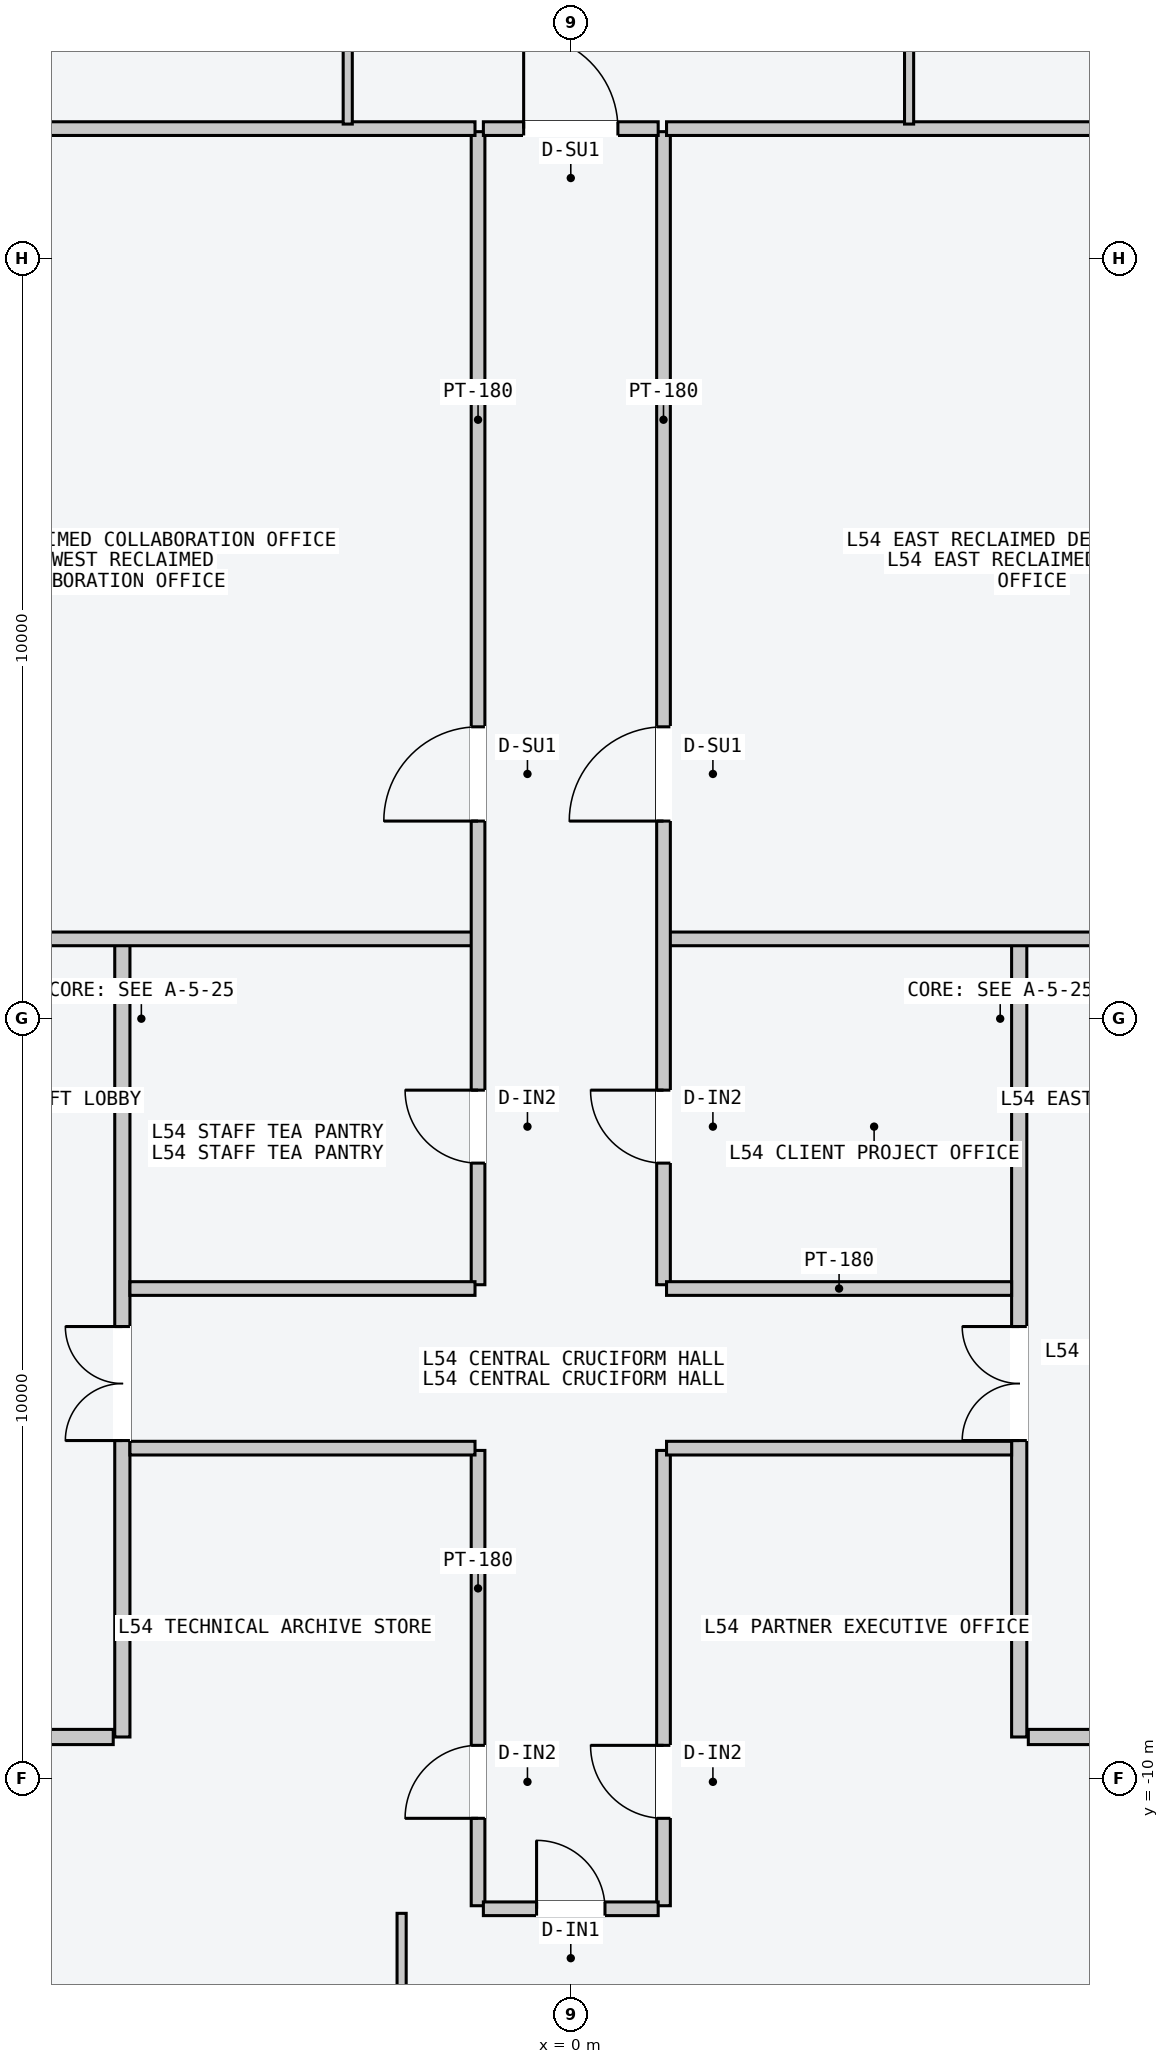
"""IFC4 building model, lengths in metres.
Left out: names, types, materials, properties, quantities, classifications, styles, units other than length and angle.
Written with IfcOpenShell. Run it as: python <this file> out.ifc"""

import sys

from ifc_helpers import new_model, si_unit, direction, frame, frame_2d, origin, place, context, subcontext, project, spatial, rectangle, extrude, element, fill, save


model = new_model("IFC4")
c1 = context("Model", 3, precision=1e-05, world=origin(), true_north=direction((0.0, 1.0)))
c2 = subcontext(c1, "Body", "Model", "MODEL_VIEW")
j1 = project(units=[si_unit("LENGTHUNIT", "METRE"), si_unit("PLANEANGLEUNIT", "RADIAN")], contexts=[c1])
p1 = place(None, origin())
s1 = spatial("IfcSite", under=j1, at=p1, CompositionType="ELEMENT")
p2 = place(p1, origin())
s2 = spatial("IfcBuilding", under=s1, at=p2, CompositionType="ELEMENT")
p3 = place(p2, frame((0.0, 0.0, 205.5)))
s3 = spatial("IfcBuildingStorey", under=s2, at=p3, CompositionType="ELEMENT", Elevation=205.5)
p4 = place(p3, frame((-5.9, -9.45, 0.0), z_axis=(0.0, 0.0, 1.0), x_axis=(0.0, 1.0, 0.0)))
e1 = element("IfcWall", 1, at=p4, inside=s3, PredefinedType="PARTITIONING", context=c2, shape_type="SweptSolid", body=[
    extrude(rectangle(XDim=10.5, YDim=0.2, at=frame_2d((5.25, 0.0))), origin(), (0.0, 0.0, 1.0), 3.4),
])
p5 = place(p4, frame((3.9, 0.0, 0.0)))
e2 = element("IfcOpeningElement", 2, at=p5, cuts=e1, PredefinedType="OPENING", context=c2, shape_type="SweptSolid", body=[
    extrude(rectangle(XDim=1.5, YDim=2.2, at=frame_2d((0.75, 1.1))), frame((0.0, 0.11, 0.0), z_axis=(0.0, -1.0, 0.0), x_axis=(1.0, 0.0, 0.0)), (0.0, 0.0, 1.0), 0.22),
])
p6 = place(p3, frame((-6.02, -9.45, 0.0), z_axis=(0.0, 0.0, 1.0), x_axis=(-1.0, 0.0, 0.0)))
e3 = element("IfcWall", 3, at=p6, inside=s3, PredefinedType="PARTITIONING", context=c2, shape_type="SweptSolid", body=[
    extrude(rectangle(XDim=1.8, YDim=0.2, at=frame_2d((0.9, 0.0))), origin(), (0.0, 0.0, 1.0), 3.4),
])
p7 = place(p3, frame((5.9, -9.45, 0.0), z_axis=(0.0, 0.0, 1.0), x_axis=(0.0, 1.0, 0.0)))
e4 = element("IfcWall", 4, at=p7, inside=s3, PredefinedType="PARTITIONING", context=c2, shape_type="SweptSolid", body=[
    extrude(rectangle(XDim=10.5, YDim=0.2, at=frame_2d((5.25, 0.0))), origin(), (0.0, 0.0, 1.0), 3.4),
])
p8 = place(p7, frame((3.9, 0.0, 0.0)))
e5 = element("IfcOpeningElement", 5, at=p8, cuts=e4, PredefinedType="OPENING", context=c2, shape_type="SweptSolid", body=[
    extrude(rectangle(XDim=1.5, YDim=2.2, at=frame_2d((0.75, 1.1))), frame((0.0, 0.11, 0.0), z_axis=(0.0, -1.0, 0.0), x_axis=(1.0, 0.0, 0.0)), (0.0, 0.0, 1.0), 0.22),
])
p9 = place(p3, frame((6.02, -9.45, 0.0), z_axis=(0.0, 0.0, 1.0), x_axis=(1.0, 0.0, 0.0)))
e6 = element("IfcWall", 6, at=p9, inside=s3, PredefinedType="PARTITIONING", context=c2, shape_type="SweptSolid", body=[
    extrude(rectangle(XDim=1.8, YDim=0.2, at=frame_2d((0.9, 0.0))), origin(), (0.0, 0.0, 1.0), 3.4),
])
p10 = place(p3, frame((-10.05, 1.05, 0.0), z_axis=(0.0, 0.0, 1.0), x_axis=(1.0, 0.0, 0.0)))
e7 = element("IfcWall", 7, at=p10, inside=s3, PredefinedType="PARTITIONING", context=c2, shape_type="SweptSolid", body=[
    extrude(rectangle(XDim=8.79, YDim=0.18, at=frame_2d((4.395, 0.0))), origin(), (0.0, 0.0, 1.0), 3.4),
])
p11 = place(p3, frame((-1.22, -3.5, 0.0), z_axis=(0.0, 0.0, 1.0), x_axis=(0.0, 1.0, 0.0)))
e8 = element("IfcWall", 8, at=p11, inside=s3, PredefinedType="PARTITIONING", context=c2, shape_type="SweptSolid", body=[
    extrude(rectangle(XDim=15.17, YDim=0.18, at=frame_2d((7.585, 0.0))), origin(), (0.0, 0.0, 1.0), 3.4),
])
p12 = place(p11, frame((6.1, 0.0, 0.0)))
e9 = element("IfcOpeningElement", 9, at=p12, cuts=e8, PredefinedType="OPENING", context=c2, shape_type="SweptSolid", body=[
    extrude(rectangle(XDim=1.24, YDim=2.24, at=frame_2d((0.62, 1.12))), frame((0.0, 0.1, 0.0), z_axis=(0.0, -1.0, 0.0), x_axis=(1.0, 0.0, 0.0)), (0.0, 0.0, 1.0), 0.2),
])
p13 = place(p11, frame((1.6, 0.0, 0.0)))
e10 = element("IfcOpeningElement", 10, at=p13, cuts=e8, PredefinedType="OPENING", context=c2, shape_type="SweptSolid", body=[
    extrude(rectangle(XDim=0.96, YDim=2.18, at=frame_2d((0.48, 1.09))), frame((0.0, 0.1, 0.0), z_axis=(0.0, -1.0, 0.0), x_axis=(1.0, 0.0, 0.0)), (0.0, 0.0, 1.0), 0.2),
])
p14 = place(p3, frame((-7.5, 11.71, 0.0), z_axis=(0.0, 0.0, 1.0), x_axis=(1.0, 0.0, 0.0)))
e11 = element("IfcWall", 11, at=p14, inside=s3, PredefinedType="PARTITIONING", context=c2, shape_type="SweptSolid", body=[
    extrude(rectangle(XDim=6.24, YDim=0.18, at=frame_2d((3.12, 0.0))), origin(), (0.0, 0.0, 1.0), 3.4),
])
p15 = place(p3, frame((-5.8, -3.55, 0.0), z_axis=(0.0, 0.0, 1.0), x_axis=(1.0, 0.0, 0.0)))
e12 = element("IfcWall", 12, at=p15, inside=s3, PredefinedType="PARTITIONING", context=c2, shape_type="SweptSolid", body=[
    extrude(rectangle(XDim=4.54, YDim=0.18, at=frame_2d((2.27, 0.0))), origin(), (0.0, 0.0, 1.0), 3.4),
])
p16 = place(p3, frame((1.26, 1.05, 0.0), z_axis=(0.0, 0.0, 1.0), x_axis=(1.0, 0.0, 0.0)))
e13 = element("IfcWall", 13, at=p16, inside=s3, PredefinedType="PARTITIONING", context=c2, shape_type="SweptSolid", body=[
    extrude(rectangle(XDim=8.8, YDim=0.18, at=frame_2d((4.4, 0.0))), origin(), (0.0, 0.0, 1.0), 3.4),
])
p17 = place(p3, frame((1.22, -3.5, 0.0), z_axis=(0.0, 0.0, 1.0), x_axis=(0.0, 1.0, 0.0)))
e14 = element("IfcWall", 14, at=p17, inside=s3, PredefinedType="PARTITIONING", context=c2, shape_type="SweptSolid", body=[
    extrude(rectangle(XDim=15.17, YDim=0.18, at=frame_2d((7.585, 0.0))), origin(), (0.0, 0.0, 1.0), 3.4),
])
p18 = place(p17, frame((6.1, 0.0, 0.0)))
e15 = element("IfcOpeningElement", 15, at=p18, cuts=e14, PredefinedType="OPENING", context=c2, shape_type="SweptSolid", body=[
    extrude(rectangle(XDim=1.24, YDim=2.24, at=frame_2d((0.62, 1.12))), frame((0.0, 0.1, 0.0), z_axis=(0.0, -1.0, 0.0), x_axis=(1.0, 0.0, 0.0)), (0.0, 0.0, 1.0), 0.2),
])
p19 = place(p17, frame((1.6, 0.0, 0.0)))
e16 = element("IfcOpeningElement", 16, at=p19, cuts=e14, PredefinedType="OPENING", context=c2, shape_type="SweptSolid", body=[
    extrude(rectangle(XDim=0.96, YDim=2.18, at=frame_2d((0.48, 1.09))), frame((0.0, 0.1, 0.0), z_axis=(0.0, -1.0, 0.0), x_axis=(1.0, 0.0, 0.0)), (0.0, 0.0, 1.0), 0.2),
])
p20 = place(p3, frame((1.26, 11.71, 0.0), z_axis=(0.0, 0.0, 1.0), x_axis=(1.0, 0.0, 0.0)))
e17 = element("IfcWall", 17, at=p20, inside=s3, PredefinedType="PARTITIONING", context=c2, shape_type="SweptSolid", body=[
    extrude(rectangle(XDim=6.24, YDim=0.18, at=frame_2d((3.12, 0.0))), origin(), (0.0, 0.0, 1.0), 3.4),
])
p21 = place(p3, frame((1.26, -3.55, 0.0), z_axis=(0.0, 0.0, 1.0), x_axis=(1.0, 0.0, 0.0)))
e18 = element("IfcWall", 18, at=p21, inside=s3, PredefinedType="PARTITIONING", context=c2, shape_type="SweptSolid", body=[
    extrude(rectangle(XDim=4.54, YDim=0.18, at=frame_2d((2.27, 0.0))), origin(), (0.0, 0.0, 1.0), 3.4),
])
p22 = place(p3, frame((-1.22, -11.67, 0.0), z_axis=(0.0, 0.0, 1.0), x_axis=(0.0, 1.0, 0.0)))
e19 = element("IfcWall", 19, at=p22, inside=s3, PredefinedType="PARTITIONING", context=c2, shape_type="SweptSolid", body=[
    extrude(rectangle(XDim=5.99, YDim=0.18, at=frame_2d((2.995, 0.0))), origin(), (0.0, 0.0, 1.0), 3.4),
])
p23 = place(p22, frame((1.15, 0.0, 0.0)))
e20 = element("IfcOpeningElement", 20, at=p23, cuts=e19, PredefinedType="OPENING", context=c2, shape_type="SweptSolid", body=[
    extrude(rectangle(XDim=0.96, YDim=2.18, at=frame_2d((0.48, 1.09))), frame((0.0, 0.1, 0.0), z_axis=(0.0, -1.0, 0.0), x_axis=(1.0, 0.0, 0.0)), (0.0, 0.0, 1.0), 0.2),
])
p24 = place(p3, frame((1.22, -11.67, 0.0), z_axis=(0.0, 0.0, 1.0), x_axis=(0.0, 1.0, 0.0)))
e21 = element("IfcWall", 21, at=p24, inside=s3, PredefinedType="PARTITIONING", context=c2, shape_type="SweptSolid", body=[
    extrude(rectangle(XDim=5.99, YDim=0.18, at=frame_2d((2.995, 0.0))), origin(), (0.0, 0.0, 1.0), 3.4),
])
p25 = place(p24, frame((1.15, 0.0, 0.0)))
e22 = element("IfcOpeningElement", 22, at=p25, cuts=e21, PredefinedType="OPENING", context=c2, shape_type="SweptSolid", body=[
    extrude(rectangle(XDim=0.96, YDim=2.18, at=frame_2d((0.48, 1.09))), frame((0.0, 0.1, 0.0), z_axis=(0.0, -1.0, 0.0), x_axis=(1.0, 0.0, 0.0)), (0.0, 0.0, 1.0), 0.2),
])
for number, where, z_axis, x_axis in (
    (23, (-5.8, -5.65, 0.0), (0.0, 0.0, 1.0), (1.0, 0.0, 0.0)),
    (24, (1.26, -5.65, 0.0), (0.0, 0.0, 1.0), (1.0, 0.0, 0.0)),
):
    element("IfcWall", number, at=place(p3, frame(where, z_axis=z_axis, x_axis=x_axis)), inside=s3, PredefinedType="PARTITIONING", context=c2, shape_type="SweptSolid", body=[
        extrude(rectangle(XDim=4.54, YDim=0.18, at=frame_2d((2.27, 0.0))), origin(), (0.0, 0.0, 1.0), 3.4),
    ])
p26 = place(p3, frame((-2.935, 11.77, 0.0), z_axis=(0.0, 0.0, 1.0), x_axis=(0.0, 1.0, 0.0)))
e25 = element("IfcWall", 25, at=p26, inside=s3, PredefinedType="PARTITIONING", context=c2, shape_type="SweptSolid", body=[
    extrude(rectangle(XDim=6.79, YDim=0.12, at=frame_2d((3.395, 0.0))), origin(), (0.0, 0.0, 1.0), 3.4),
])
p27 = place(p26, frame((1.15, 0.0, 0.0)))
e26 = element("IfcOpeningElement", 26, at=p27, cuts=e25, PredefinedType="OPENING", context=c2, shape_type="SweptSolid", body=[
    extrude(rectangle(XDim=0.96, YDim=2.18, at=frame_2d((0.48, 1.09))), frame((0.0, 0.07, 0.0), z_axis=(0.0, -1.0, 0.0), x_axis=(1.0, 0.0, 0.0)), (0.0, 0.0, 1.0), 0.14),
])
p28 = place(p3, frame((4.451, 11.77, 0.0), z_axis=(0.0, 0.0, 1.0), x_axis=(0.0, 1.0, 0.0)))
e27 = element("IfcWall", 27, at=p28, inside=s3, PredefinedType="PARTITIONING", context=c2, shape_type="SweptSolid", body=[
    extrude(rectangle(XDim=6.79, YDim=0.12, at=frame_2d((3.395, 0.0))), origin(), (0.0, 0.0, 1.0), 3.4),
])
p29 = place(p28, frame((1.15, 0.0, 0.0)))
e28 = element("IfcOpeningElement", 28, at=p29, cuts=e27, PredefinedType="OPENING", context=c2, shape_type="SweptSolid", body=[
    extrude(rectangle(XDim=0.96, YDim=2.18, at=frame_2d((0.48, 1.09))), frame((0.0, 0.07, 0.0), z_axis=(0.0, -1.0, 0.0), x_axis=(1.0, 0.0, 0.0)), (0.0, 0.0, 1.0), 0.14),
])
p30 = place(p3, frame((-1.15, 11.71, 0.0), z_axis=(0.0, 0.0, 1.0), x_axis=(1.0, 0.0, 0.0)))
e29 = element("IfcWall", 29, at=p30, inside=s3, PredefinedType="PARTITIONING", context=c2, shape_type="SweptSolid", body=[
    extrude(rectangle(XDim=2.3, YDim=0.18, at=frame_2d((1.15, 0.0))), origin(), (0.0, 0.0, 1.0), 3.4),
])
p31 = place(p30, frame((0.53, 0.0, 0.0)))
e30 = element("IfcOpeningElement", 30, at=p31, cuts=e29, PredefinedType="OPENING", context=c2, shape_type="SweptSolid", body=[
    extrude(rectangle(XDim=1.24, YDim=2.24, at=frame_2d((0.62, 1.12))), frame((0.0, 0.1, 0.0), z_axis=(0.0, -1.0, 0.0), x_axis=(1.0, 0.0, 0.0)), (0.0, 0.0, 1.0), 0.2),
])
p32 = place(p3, frame((-2.226, -18.56, 0.0), z_axis=(0.0, 0.0, 1.0), x_axis=(0.0, 1.0, 0.0)))
e31 = element("IfcWall", 31, at=p32, inside=s3, PredefinedType="PARTITIONING", context=c2, shape_type="SweptSolid", body=[
    extrude(rectangle(XDim=6.79, YDim=0.12, at=frame_2d((3.395, 0.0))), origin(), (0.0, 0.0, 1.0), 3.4),
])
p33 = place(p32, frame((1.05, 0.0, 0.0)))
e32 = element("IfcOpeningElement", 32, at=p33, cuts=e31, PredefinedType="OPENING", context=c2, shape_type="SweptSolid", body=[
    extrude(rectangle(XDim=0.96, YDim=2.18, at=frame_2d((0.48, 1.09))), frame((0.0, 0.07, 0.0), z_axis=(0.0, -1.0, 0.0), x_axis=(1.0, 0.0, 0.0)), (0.0, 0.0, 1.0), 0.14),
])
p34 = place(p3, frame((-1.15, -11.71, 0.0), z_axis=(0.0, 0.0, 1.0), x_axis=(1.0, 0.0, 0.0)))
e33 = element("IfcWall", 33, at=p34, inside=s3, PredefinedType="PARTITIONING", context=c2, shape_type="SweptSolid", body=[
    extrude(rectangle(XDim=2.3, YDim=0.18, at=frame_2d((1.15, 0.0))), origin(), (0.0, 0.0, 1.0), 3.4),
])
p35 = place(p34, frame((0.7, 0.0, 0.0)))
e34 = element("IfcOpeningElement", 34, at=p35, cuts=e33, PredefinedType="OPENING", context=c2, shape_type="SweptSolid", body=[
    extrude(rectangle(XDim=0.9, YDim=2.15, at=frame_2d((0.45, 1.075))), frame((0.0, 0.1, 0.0), z_axis=(0.0, -1.0, 0.0), x_axis=(1.0, 0.0, 0.0)), (0.0, 0.0, 1.0), 0.2),
])
p36 = place(p5, origin())
e35 = element("IfcDoor", 35, at=p36, inside=s3, OperationType="DOUBLE_DOOR_SINGLE_SWING", PredefinedType="DOOR", context=c2, shape_type="SweptSolid", body=[
    extrude(rectangle(XDim=1.5, YDim=2.2, at=frame_2d((0.75, 1.1))), frame((0.0, 0.025, 0.0), z_axis=(0.0, -1.0, 0.0), x_axis=(1.0, 0.0, 0.0)), (0.0, 0.0, 1.0), 0.05),
])
fill(e2, e35)
p37 = place(p8, origin())
e36 = element("IfcDoor", 36, at=p37, inside=s3, OperationType="DOUBLE_DOOR_SINGLE_SWING", PredefinedType="DOOR", context=c2, shape_type="SweptSolid", body=[
    extrude(rectangle(XDim=1.5, YDim=2.2, at=frame_2d((0.75, 1.1))), frame((0.0, 0.025, 0.0), z_axis=(0.0, -1.0, 0.0), x_axis=(1.0, 0.0, 0.0)), (0.0, 0.0, 1.0), 0.05),
])
fill(e5, e36)
p38 = place(p12, origin())
e37 = element("IfcDoor", 37, at=p38, inside=s3, OperationType="SINGLE_SWING_LEFT", PredefinedType="DOOR", context=c2, shape_type="SweptSolid", body=[
    extrude(rectangle(XDim=1.24, YDim=2.24, at=frame_2d((0.62, 1.12))), frame((0.0, 0.025, 0.0), z_axis=(0.0, -1.0, 0.0), x_axis=(1.0, 0.0, 0.0)), (0.0, 0.0, 1.0), 0.05),
])
fill(e9, e37)
p39 = place(p13, origin())
e38 = element("IfcDoor", 38, at=p39, inside=s3, OperationType="SINGLE_SWING_RIGHT", PredefinedType="DOOR", context=c2, shape_type="SweptSolid", body=[
    extrude(rectangle(XDim=0.96, YDim=2.18, at=frame_2d((0.48, 1.09))), frame((0.0, 0.025, 0.0), z_axis=(0.0, -1.0, 0.0), x_axis=(1.0, 0.0, 0.0)), (0.0, 0.0, 1.0), 0.05),
])
fill(e10, e38)
p40 = place(p18, origin())
e39 = element("IfcDoor", 39, at=p40, inside=s3, OperationType="SINGLE_SWING_LEFT", PredefinedType="DOOR", context=c2, shape_type="SweptSolid", body=[
    extrude(rectangle(XDim=1.24, YDim=2.24, at=frame_2d((0.62, 1.12))), frame((0.0, 0.025, 0.0), z_axis=(0.0, -1.0, 0.0), x_axis=(1.0, 0.0, 0.0)), (0.0, 0.0, 1.0), 0.05),
])
fill(e15, e39)
p41 = place(p19, origin())
e40 = element("IfcDoor", 40, at=p41, inside=s3, OperationType="SINGLE_SWING_RIGHT", PredefinedType="DOOR", context=c2, shape_type="SweptSolid", body=[
    extrude(rectangle(XDim=0.96, YDim=2.18, at=frame_2d((0.48, 1.09))), frame((0.0, 0.025, 0.0), z_axis=(0.0, -1.0, 0.0), x_axis=(1.0, 0.0, 0.0)), (0.0, 0.0, 1.0), 0.05),
])
fill(e16, e40)
p42 = place(p23, origin())
e41 = element("IfcDoor", 41, at=p42, inside=s3, OperationType="SINGLE_SWING_LEFT", PredefinedType="DOOR", context=c2, shape_type="SweptSolid", body=[
    extrude(rectangle(XDim=0.96, YDim=2.18, at=frame_2d((0.48, 1.09))), frame((0.0, 0.025, 0.0), z_axis=(0.0, -1.0, 0.0), x_axis=(1.0, 0.0, 0.0)), (0.0, 0.0, 1.0), 0.05),
])
fill(e20, e41)
p43 = place(p25, origin())
e42 = element("IfcDoor", 42, at=p43, inside=s3, OperationType="SINGLE_SWING_RIGHT", PredefinedType="DOOR", context=c2, shape_type="SweptSolid", body=[
    extrude(rectangle(XDim=0.96, YDim=2.18, at=frame_2d((0.48, 1.09))), frame((0.0, 0.025, 0.0), z_axis=(0.0, -1.0, 0.0), x_axis=(1.0, 0.0, 0.0)), (0.0, 0.0, 1.0), 0.05),
])
fill(e22, e42)
p44 = place(p31, origin())
e43 = element("IfcDoor", 43, at=p44, inside=s3, OperationType="SINGLE_SWING_LEFT", PredefinedType="DOOR", context=c2, shape_type="SweptSolid", body=[
    extrude(rectangle(XDim=1.24, YDim=2.24, at=frame_2d((0.62, 1.12))), frame((0.0, 0.025, 0.0), z_axis=(0.0, -1.0, 0.0), x_axis=(1.0, 0.0, 0.0)), (0.0, 0.0, 1.0), 0.05),
])
fill(e30, e43)
p45 = place(p35, origin())
e44 = element("IfcDoor", 44, at=p45, inside=s3, OperationType="SINGLE_SWING_LEFT", PredefinedType="DOOR", context=c2, shape_type="SweptSolid", body=[
    extrude(rectangle(XDim=0.9, YDim=2.15, at=frame_2d((0.45, 1.075))), frame((0.0, 0.025, 0.0), z_axis=(0.0, -1.0, 0.0), x_axis=(1.0, 0.0, 0.0)), (0.0, 0.0, 1.0), 0.05),
])
fill(e34, e44)
save(model, sys.argv[1])
